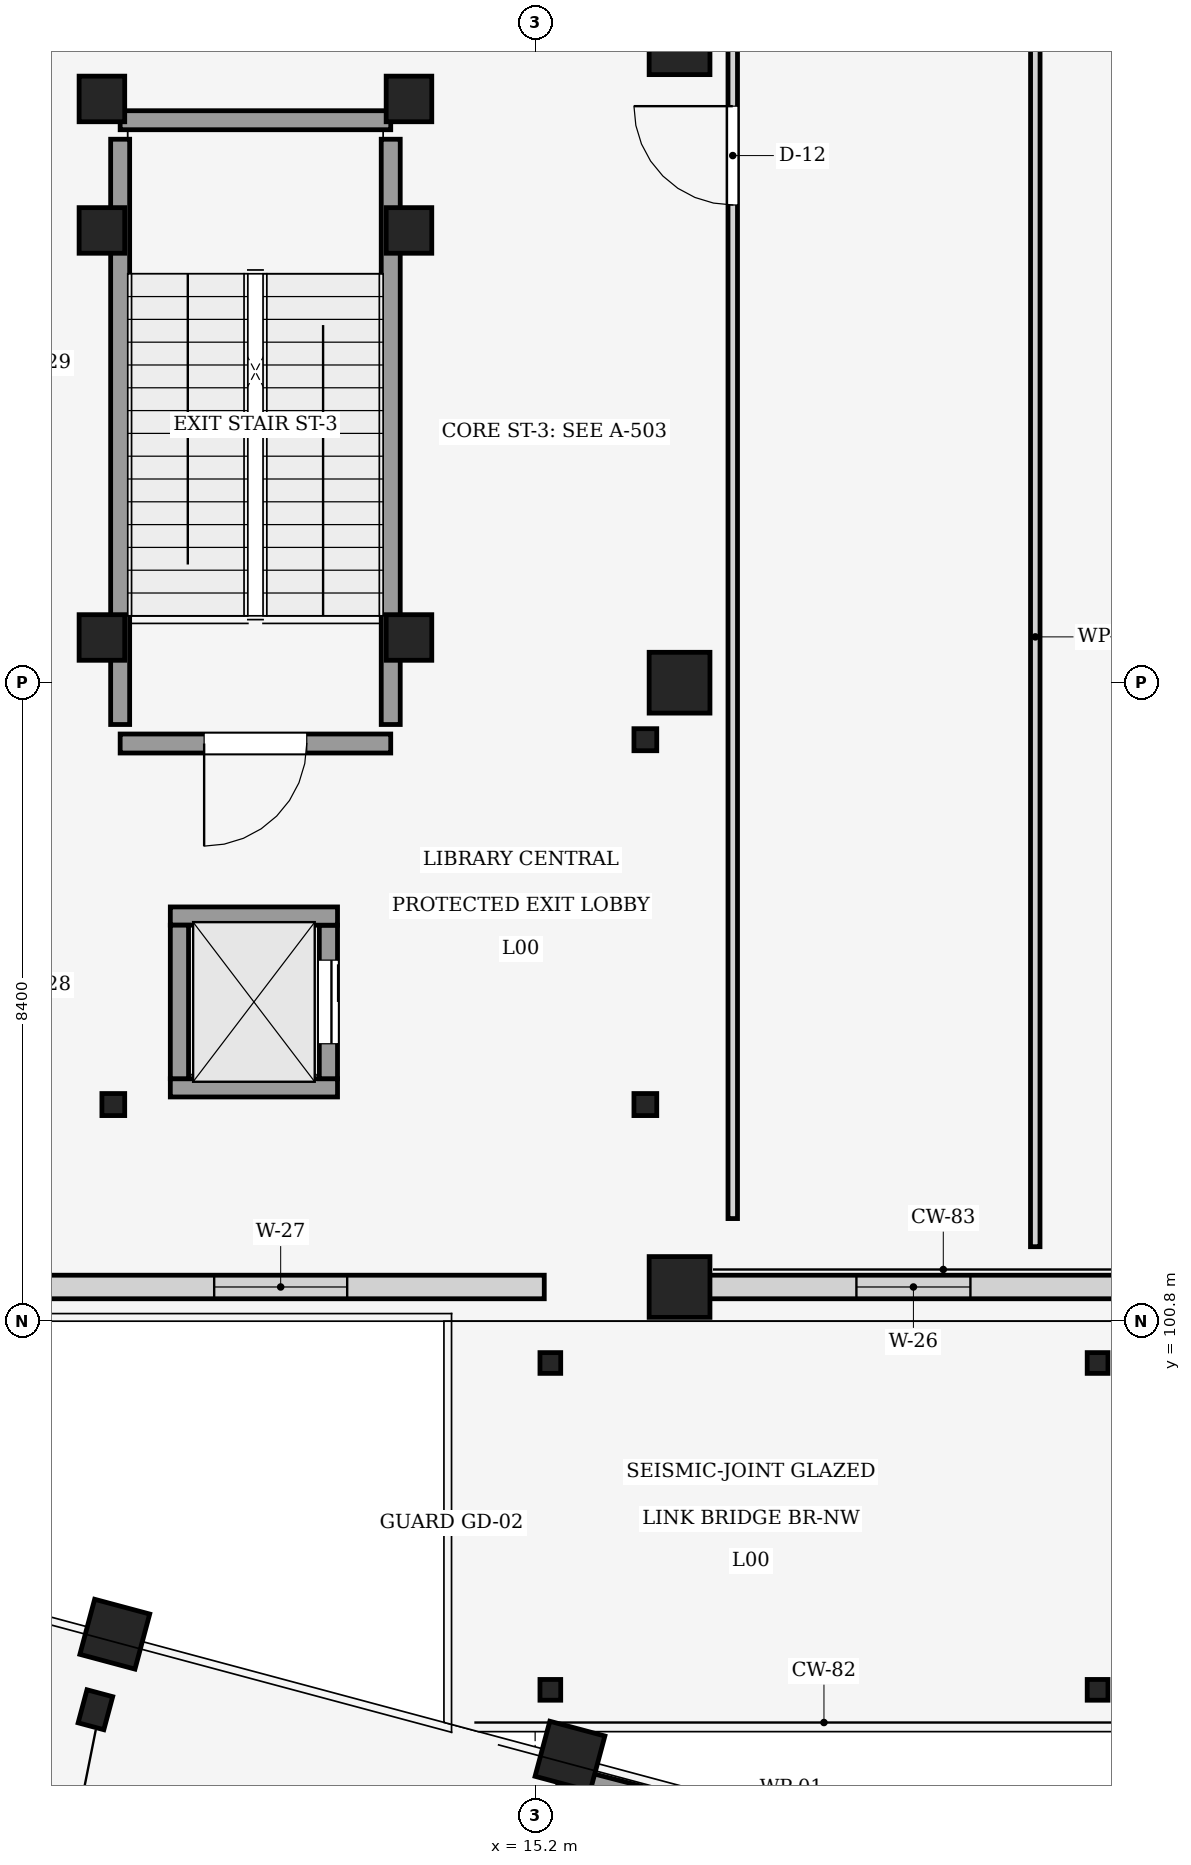
"""IFC4 building model, lengths in metres.
Left out: names, types, materials, properties, quantities, classifications, styles, units other than length and angle.
Written with IfcOpenShell. Run it as: python <this file> out.ifc"""

import sys

from ifc_helpers import new_model, si_unit, direction, frame, frame_2d, origin, origin_2d, place, context, subcontext, project, spatial, rectangle, circle, hollow_circle, i_section, extrude, element, fill, save


model = new_model("IFC4")
c1 = context("Model", 3, precision=1e-05, world=origin(), true_north=direction((0.0, 1.0)))
c2 = subcontext(c1, "Body", "Model", "MODEL_VIEW")
j1 = project(units=[si_unit("LENGTHUNIT", "METRE"), si_unit("PLANEANGLEUNIT", "RADIAN")], contexts=[c1])
p1 = place(None, origin())
s1 = spatial("IfcSite", under=j1, at=p1, CompositionType="ELEMENT")
p2 = place(p1, origin())
s2 = spatial("IfcBuilding", under=s1, at=p2, CompositionType="ELEMENT")
p3 = place(p2, origin())
s3 = spatial("IfcBuildingStorey", under=s2, at=p3, CompositionType="ELEMENT", Elevation=0.0)
for number, where, z_axis, x_axis in (
    (1, (15.658, 95.077, 0.0), (0.0, 0.0, 1.0), (-0.966, 0.259, 0.0)),
    (2, (9.67, 96.682, 0.0), (0.0, 0.0, 1.0), (-0.966, 0.259, 0.0)),
):
    element("IfcColumn", number, at=place(p3, frame(where, z_axis=z_axis, x_axis=x_axis)), inside=s3, PredefinedType="COLUMN", context=c2, shape_type="SweptSolid", body=[
        extrude(circle(Radius=0.375, at=origin_2d()), origin(), (0.0, 0.0, 1.0), 5.1),
    ])
p4 = place(p3, frame((9.414, 95.688, 0.0), z_axis=(0.0, 0.0, 1.0), x_axis=(-0.965925826289, 0.258819045103, 0.0)))
e3 = element("IfcColumn", 3, at=p4, inside=s3, PredefinedType="PILASTER", context=c2, shape_type="SweptSolid", body=[
    extrude(rectangle(XDim=0.35, YDim=0.45, at=origin_2d()), origin(), (0.0, 0.0, 1.0), 5.1),
])
for number, where, z_axis, x_axis in (
    (4, (17.1, 101.25, 0.0), (0.0, 0.0, 1.0), (1.0, 0.0, 0.0)),
    (5, (17.1, 109.2, 0.0), (0.0, 0.0, 1.0), (1.0, 0.0, 0.0)),
    (6, (17.1, 117.6, 0.0), (0.0, 0.0, 1.0), (1.0, 0.0, 0.0)),
):
    element("IfcColumn", number, at=place(p3, frame(where, z_axis=z_axis, x_axis=x_axis)), inside=s3, PredefinedType="COLUMN", context=c2, shape_type="SweptSolid", body=[
        extrude(rectangle(XDim=0.8, YDim=0.8, at=origin_2d()), origin(), (0.0, 0.0, 1.0), 5.1),
    ])
for number, where, z_axis, x_axis in (
    (7, (15.4, 95.95, 0.0), (0.0, 0.0, 1.0), (1.0, 0.0, 0.0)),
    (8, (22.6, 95.95, 0.0), (0.0, 0.0, 1.0), (1.0, 0.0, 0.0)),
    (9, (22.6, 100.25, 0.0), (0.0, 0.0, 1.0), (1.0, 0.0, 0.0)),
    (10, (15.4, 100.25, 0.0), (0.0, 0.0, 1.0), (1.0, 0.0, 0.0)),
):
    element("IfcColumn", number, at=place(p3, frame(where, z_axis=z_axis, x_axis=x_axis)), inside=s3, PredefinedType="COLUMN", context=c2, shape_type="SweptSolid", body=[
        extrude(hollow_circle(Radius=0.136, WallThickness=0.016, at=origin_2d()), origin(), (0.0, 0.0, 1.0), 4.87),
    ])
for number, where, z_axis, x_axis in (
    (11, (13.54, 109.795, 0.0), (0.0, 0.0, 1.0), (1.0, 0.0, 0.0)),
    (12, (9.5, 109.795, 0.0), (0.0, 0.0, 1.0), (1.0, 0.0, 0.0)),
    (13, (13.54, 115.15, 0.0), (0.0, 0.0, 1.0), (1.0, 0.0, 0.0)),
    (14, (9.5, 115.15, 0.0), (0.0, 0.0, 1.0), (1.0, 0.0, 0.0)),
    (15, (13.54, 116.88, 0.0), (0.0, 0.0, 1.0), (1.0, 0.0, 0.0)),
    (16, (9.5, 116.88, 0.0), (0.0, 0.0, 1.0), (1.0, 0.0, 0.0)),
):
    element("IfcColumn", number, at=place(p3, frame(where, z_axis=z_axis, x_axis=x_axis)), inside=s3, PredefinedType="COLUMN", context=c2, shape_type="SweptSolid", body=[
        extrude(rectangle(XDim=0.6, YDim=0.6, at=origin_2d()), origin(), (0.0, 0.0, 1.0), 5.1),
    ])
for number, where, z_axis, x_axis in (
    (17, (9.65, 103.65, 0.0), (0.0, 0.0, 1.0), (1.0, 0.0, 0.0)),
    (18, (16.65, 103.65, 0.0), (0.0, 0.0, 1.0), (1.0, 0.0, 0.0)),
    (19, (16.65, 108.45, 0.0), (0.0, 0.0, 1.0), (1.0, 0.0, 0.0)),
):
    element("IfcColumn", number, at=place(p3, frame(where, z_axis=z_axis, x_axis=x_axis)), inside=s3, PredefinedType="COLUMN", context=c2, shape_type="SweptSolid", body=[
        extrude(i_section(OverallWidth=0.3, OverallDepth=0.29, WebThickness=0.009, FlangeThickness=0.014, at=origin_2d()), origin(), (0.0, 0.0, 1.0), 5.1),
    ])
p5 = place(p3, frame((15.515, 94.768, 0.0), z_axis=(0.0, 0.0, 1.0), x_axis=(0.967930025072, -0.251219956541, 0.0)))
e20 = element("IfcWall", 20, at=p5, inside=s3, PredefinedType="SHEAR", context=c2, shape_type="SweptSolid", body=[
    extrude(rectangle(XDim=6.31, YDim=0.38, at=frame_2d((3.155, 0.0))), origin(), (0.0, 0.0, 1.0), 4.8),
])
p6 = place(p3, frame((22.92, 101.25, 0.0), z_axis=(0.0, 0.0, 1.0), x_axis=(-1.0, 0.0, 0.0)))
e21 = element("IfcWall", 21, at=p6, inside=s3, PredefinedType="STANDARD", context=c2, shape_type="SweptSolid", body=[
    extrude(rectangle(XDim=5.485, YDim=0.31, at=frame_2d((2.742, 0.0))), origin(), (0.0, 0.0, 1.0), 4.045),
])
p7 = place(p6, frame((1.993, 0.0, 0.85)))
e22 = element("IfcOpeningElement", 22, at=p7, cuts=e21, PredefinedType="OPENING", context=c2, shape_type="SweptSolid", body=[
    extrude(rectangle(XDim=1.5, YDim=1.85, at=frame_2d((0.75, 0.925))), frame((0.0, 0.165, 0.0), z_axis=(0.0, -1.0, 0.0), x_axis=(1.0, 0.0, 0.0)), (0.0, 0.0, 1.0), 0.33),
])
p8 = place(p3, frame((15.32, 101.25, 0.0), z_axis=(0.0, 0.0, 1.0), x_axis=(-1.0, 0.0, 0.0)))
e23 = element("IfcWall", 23, at=p8, inside=s3, PredefinedType="STANDARD", context=c2, shape_type="SweptSolid", body=[
    extrude(rectangle(XDim=6.935, YDim=0.31, at=frame_2d((3.468, 0.0))), origin(), (0.0, 0.0, 1.0), 4.045),
])
p9 = place(p8, frame((2.593, 0.0, 0.85)))
e24 = element("IfcOpeningElement", 24, at=p9, cuts=e23, PredefinedType="OPENING", context=c2, shape_type="SweptSolid", body=[
    extrude(rectangle(XDim=1.75, YDim=1.85, at=frame_2d((0.875, 0.925))), frame((0.0, 0.165, 0.0), z_axis=(0.0, -1.0, 0.0), x_axis=(1.0, 0.0, 0.0)), (0.0, 0.0, 1.0), 0.33),
])
p10 = place(p3, frame((13.3, 108.4, 0.0), z_axis=(0.0, 0.0, 1.0), x_axis=(-1.0, 0.0, 0.0)))
e25 = element("IfcWall", 25, at=p10, inside=s3, PredefinedType="SHEAR", context=c2, shape_type="SweptSolid", body=[
    extrude(rectangle(XDim=3.56, YDim=0.25, at=frame_2d((1.78, 0.0))), origin(), (0.0, 0.0, 1.0), 5.1),
])
p11 = place(p10, frame((1.105, 0.0, 0.0)))
e26 = element("IfcOpeningElement", 26, at=p11, cuts=e25, PredefinedType="OPENING", context=c2, shape_type="SweptSolid", body=[
    extrude(rectangle(XDim=1.35, YDim=2.2, at=frame_2d((0.675, 1.1))), frame((0.0, 0.135, 0.0), z_axis=(0.0, -1.0, 0.0), x_axis=(1.0, 0.0, 0.0)), (0.0, 0.0, 1.0), 0.27),
])
p12 = place(p3, frame((9.74, 108.65, 0.0), z_axis=(0.0, 0.0, 1.0), x_axis=(0.0, 1.0, 0.0)))
e27 = element("IfcWall", 27, at=p12, inside=s3, PredefinedType="SHEAR", context=c2, shape_type="SweptSolid", body=[
    extrude(rectangle(XDim=7.7, YDim=0.25, at=frame_2d((3.85, 0.0))), origin(), (0.0, 0.0, 1.0), 5.1),
])
p13 = place(p3, frame((9.74, 116.6, 0.0), z_axis=(0.0, 0.0, 1.0), x_axis=(1.0, 0.0, 0.0)))
e28 = element("IfcWall", 28, at=p13, inside=s3, PredefinedType="SHEAR", context=c2, shape_type="SweptSolid", body=[
    extrude(rectangle(XDim=3.56, YDim=0.25, at=frame_2d((1.78, 0.0))), origin(), (0.0, 0.0, 1.0), 5.1),
])
p14 = place(p3, frame((13.3, 116.35, 0.0), z_axis=(0.0, 0.0, 1.0), x_axis=(0.0, -1.0, 0.0)))
e29 = element("IfcWall", 29, at=p14, inside=s3, PredefinedType="SHEAR", context=c2, shape_type="SweptSolid", body=[
    extrude(rectangle(XDim=7.7, YDim=0.25, at=frame_2d((3.85, 0.0))), origin(), (0.0, 0.0, 1.0), 5.1),
])
p15 = place(p3, frame((12.6, 103.87, 0.0), z_axis=(0.0, 0.0, 1.0), x_axis=(-1.0, 0.0, 0.0)))
e30 = element("IfcWall", 30, at=p15, inside=s3, PredefinedType="SHEAR", context=c2, shape_type="SweptSolid", body=[
    extrude(rectangle(XDim=2.2, YDim=0.24, at=frame_2d((1.1, 0.0))), origin(), (0.0, 0.0, 1.0), 5.1),
])
p16 = place(p3, frame((12.48, 106.01, 0.0), z_axis=(0.0, 0.0, 1.0), x_axis=(0.0, -1.0, 0.0)))
e31 = element("IfcWall", 31, at=p16, inside=s3, PredefinedType="SHEAR", context=c2, shape_type="SweptSolid", body=[
    extrude(rectangle(XDim=2.02, YDim=0.24, at=frame_2d((1.01, 0.0))), origin(), (0.0, 0.0, 1.0), 5.1),
])
p17 = place(p16, frame((0.46, 0.0, 0.0)))
e32 = element("IfcOpeningElement", 32, at=p17, cuts=e31, PredefinedType="OPENING", context=c2, shape_type="SweptSolid", body=[
    extrude(rectangle(XDim=1.1, YDim=2.15, at=frame_2d((0.55, 1.075))), frame((0.0, 0.13, 0.0), z_axis=(0.0, -1.0, 0.0), x_axis=(1.0, 0.0, 0.0)), (0.0, 0.0, 1.0), 0.26),
])
p18 = place(p3, frame((10.4, 106.13, 0.0), z_axis=(0.0, 0.0, 1.0), x_axis=(1.0, 0.0, 0.0)))
e33 = element("IfcWall", 33, at=p18, inside=s3, PredefinedType="SHEAR", context=c2, shape_type="SweptSolid", body=[
    extrude(rectangle(XDim=2.2, YDim=0.24, at=frame_2d((1.1, 0.0))), origin(), (0.0, 0.0, 1.0), 5.1),
])
p19 = place(p3, frame((10.52, 103.99, 0.0), z_axis=(0.0, 0.0, 1.0), x_axis=(0.0, 1.0, 0.0)))
e34 = element("IfcWall", 34, at=p19, inside=s3, PredefinedType="SHEAR", context=c2, shape_type="SweptSolid", body=[
    extrude(rectangle(XDim=2.02, YDim=0.24, at=frame_2d((1.01, 0.0))), origin(), (0.0, 0.0, 1.0), 5.1),
])
p20 = place(p3, frame((17.8, 102.15, 0.0), z_axis=(0.0, 0.0, 1.0), x_axis=(0.0, 1.0, 0.0)))
e35 = element("IfcWall", 35, at=p20, inside=s3, PredefinedType="PARTITIONING", context=c2, shape_type="SweptSolid", body=[
    extrude(rectangle(XDim=29.67, YDim=0.125, at=frame_2d((14.835, 0.0))), origin(), (0.0, 0.0, 1.0), 4.045),
])
p21 = place(p20, frame((13.335, 0.0, 0.0)))
e36 = element("IfcOpeningElement", 36, at=p21, cuts=e35, PredefinedType="OPENING", context=c2, shape_type="SweptSolid", body=[
    extrude(rectangle(XDim=1.3, YDim=2.22, at=frame_2d((0.65, 1.11))), frame((0.0, 0.073, 0.0), z_axis=(0.0, -1.0, 0.0), x_axis=(1.0, 0.0, 0.0)), (0.0, 0.0, 1.0), 0.145),
])
p22 = place(p3, frame((21.78, 101.78, 0.0), z_axis=(0.0, 0.0, 1.0), x_axis=(6.0861494e-05, 0.999999998148, 0.0)))
e37 = element("IfcWall", 37, at=p22, inside=s3, PredefinedType="PARTITIONING", context=c2, shape_type="SweptSolid", body=[
    extrude(rectangle(XDim=16.046, YDim=0.125, at=frame_2d((8.023, 0.0))), origin(), (0.0, 0.0, 1.0), 4.045),
])
p23 = place(p7, origin())
e38 = element("IfcWindow", 38, at=p23, inside=s3, PartitioningType="SINGLE_PANEL", PredefinedType="WINDOW", context=c2, shape_type="SweptSolid", body=[
    extrude(rectangle(XDim=1.5, YDim=1.85, at=frame_2d((0.75, 0.925))), frame((0.0, 0.03, 0.0), z_axis=(0.0, -1.0, 0.0), x_axis=(1.0, 0.0, 0.0)), (0.0, 0.0, 1.0), 0.06),
])
fill(e22, e38)
p24 = place(p9, origin())
e39 = element("IfcWindow", 39, at=p24, inside=s3, PartitioningType="SINGLE_PANEL", PredefinedType="WINDOW", context=c2, shape_type="SweptSolid", body=[
    extrude(rectangle(XDim=1.75, YDim=1.85, at=frame_2d((0.875, 0.925))), frame((0.0, 0.03, 0.0), z_axis=(0.0, -1.0, 0.0), x_axis=(1.0, 0.0, 0.0)), (0.0, 0.0, 1.0), 0.06),
])
fill(e24, e39)
p25 = place(p11, origin())
e40 = element("IfcDoor", 40, at=p25, inside=s3, OperationType="SINGLE_SWING_RIGHT", PredefinedType="DOOR", context=c2, shape_type="SweptSolid", body=[
    extrude(rectangle(XDim=1.35, YDim=2.2, at=frame_2d((0.675, 1.1))), frame((0.0, 0.025, 0.0), z_axis=(0.0, -1.0, 0.0), x_axis=(1.0, 0.0, 0.0)), (0.0, 0.0, 1.0), 0.05),
])
fill(e26, e40)
p26 = place(p17, origin())
e41 = element("IfcDoor", 41, at=p26, inside=s3, OperationType="SLIDING_TO_LEFT", PredefinedType="DOOR", context=c2, shape_type="SweptSolid", body=[
    extrude(rectangle(XDim=1.1, YDim=2.15, at=frame_2d((0.55, 1.075))), frame((0.0, 0.025, 0.0), z_axis=(0.0, -1.0, 0.0), x_axis=(1.0, 0.0, 0.0)), (0.0, 0.0, 1.0), 0.05),
])
fill(e32, e41)
p27 = place(p21, origin())
e42 = element("IfcDoor", 42, at=p27, inside=s3, OperationType="SINGLE_SWING_RIGHT", PredefinedType="DOOR", context=c2, shape_type="SweptSolid", body=[
    extrude(rectangle(XDim=1.3, YDim=2.22, at=frame_2d((0.65, 1.11))), frame((0.0, 0.025, 0.0), z_axis=(0.0, -1.0, 0.0), x_axis=(1.0, 0.0, 0.0)), (0.0, 0.0, 1.0), 0.05),
])
fill(e36, e42)
save(model, sys.argv[1])
